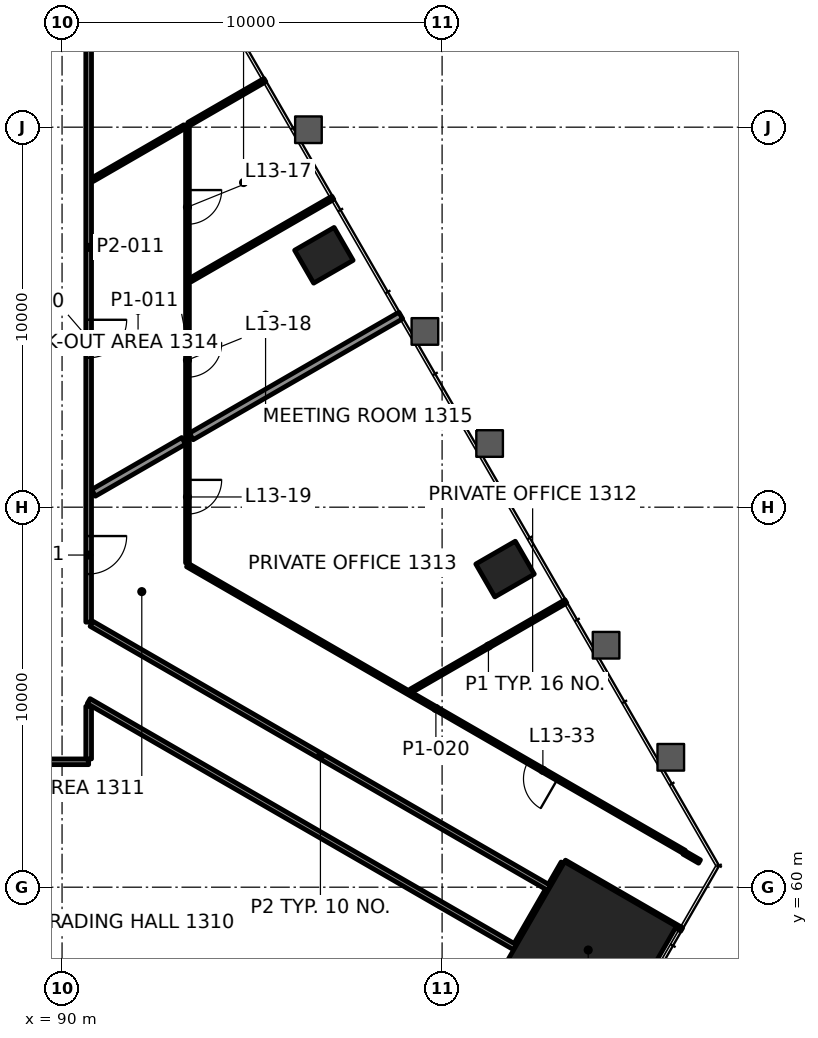
"""IFC4 building model, lengths in metres.
Left out: names, types, materials, properties, quantities, classifications, styles, units other than length and angle.
Written with IfcOpenShell. Run it as: python <this file> out.ifc"""

import sys

from ifc_helpers import new_model, si_unit, direction, frame, frame_2d, origin, origin_2d, place, context, subcontext, project, spatial, rectangle, extrude, element, fill, save


model = new_model("IFC4")
c1 = context("Model", 3, precision=1e-05, world=origin(), true_north=direction((0.0, 1.0)))
c2 = subcontext(c1, "Body", "Model", "MODEL_VIEW")
j1 = project(units=[si_unit("LENGTHUNIT", "METRE"), si_unit("PLANEANGLEUNIT", "RADIAN")], contexts=[c1])
p1 = place(None, origin())
s1 = spatial("IfcSite", under=j1, at=p1, CompositionType="ELEMENT")
p2 = place(p1, origin())
s2 = spatial("IfcBuilding", under=s1, at=p2, CompositionType="ELEMENT")
p3 = place(p2, frame((0.0, 0.0, 61.0)))
s3 = spatial("IfcBuildingStorey", under=s2, at=p3, CompositionType="ELEMENT", Elevation=61.0)
p4 = place(p3, frame((103.844, 58.347, 0.0), z_axis=(0.0, 0.0, 1.0), x_axis=(0.5, 0.866025403784, 0.0)))
e1 = element("IfcColumn", 1, at=p4, inside=s3, PredefinedType="COLUMN", context=c2, shape_type="SweptSolid", body=[
    extrude(rectangle(XDim=3.4, YDim=3.4, at=origin_2d()), origin(), (0.0, 0.0, 1.0), 4.2),
])
for number, where, z_axis, x_axis in (
    (2, (101.657, 68.371, -0.0), (0.0, 0.0, 1.0), (-0.5, 0.866, 0.0)),
    (3, (96.889, 76.628, -0.0), (0.0, 0.0, 1.0), (-0.5, 0.866, 0.0)),
):
    element("IfcColumn", number, at=place(p3, frame(where, z_axis=z_axis, x_axis=x_axis)), inside=s3, PredefinedType="COLUMN", context=c2, shape_type="SweptSolid", body=[
        extrude(rectangle(XDim=1.0, YDim=1.2, at=origin_2d()), origin(), (0.0, 0.0, 1.0), 4.2),
    ])
p5 = place(p3, frame((90.699, 63.3, 0.0), z_axis=(0.0, 0.0, 1.0), x_axis=(-1.0, 0.0, 0.0)))
e4 = element("IfcWall", 4, at=p5, inside=s3, PredefinedType="PARTITIONING", context=c2, shape_type="SweptSolid", body=[
    extrude(rectangle(XDim=31.399, YDim=0.15, at=frame_2d((15.7, 0.0))), origin(), (0.0, 0.0, 1.0), 3.4),
])
p6 = place(p5, frame((4.968, 0.0, 0.0)))
e5 = element("IfcOpeningElement", 5, at=p6, cuts=e4, PredefinedType="OPENING", context=c2, shape_type="SweptSolid", body=[
    extrude(rectangle(XDim=1.2, YDim=2.1, at=frame_2d((0.6, 1.05))), frame((0.0, 0.085, 0.0), z_axis=(0.0, -1.0, 0.0), x_axis=(1.0, 0.0, 0.0)), (0.0, 0.0, 1.0), 0.17),
])
p7 = place(p5, frame((13.908, 0.0, 0.0)))
e6 = element("IfcOpeningElement", 6, at=p7, cuts=e4, PredefinedType="OPENING", context=c2, shape_type="SweptSolid", body=[
    extrude(rectangle(XDim=1.2, YDim=2.1, at=frame_2d((0.6, 1.05))), frame((0.0, 0.085, 0.0), z_axis=(0.0, -1.0, 0.0), x_axis=(1.0, 0.0, 0.0)), (0.0, 0.0, 1.0), 0.17),
])
p8 = place(p5, frame((24.14, 0.0, 0.0)))
e7 = element("IfcOpeningElement", 7, at=p8, cuts=e4, PredefinedType="OPENING", context=c2, shape_type="SweptSolid", body=[
    extrude(rectangle(XDim=1.0, YDim=2.1, at=frame_2d((0.5, 1.05))), frame((0.0, 0.085, 0.0), z_axis=(0.0, -1.0, 0.0), x_axis=(1.0, 0.0, 0.0)), (0.0, 0.0, 1.0), 0.17),
])
p9 = place(p3, frame((99.182, 65.168, 0.0), z_axis=(0.0, 0.0, 1.0), x_axis=(0.866024864377, 0.50000093428, 0.0)))
e8 = element("IfcWall", 8, at=p9, inside=s3, PredefinedType="PARTITIONING", context=c2, shape_type="SweptSolid", body=[
    extrude(rectangle(XDim=4.705, YDim=0.1, at=frame_2d((2.353, 0.0))), origin(), (0.0, 0.0, 1.0), 3.4),
])
p10 = place(p3, frame((90.827, 70.376, 0.0), z_axis=(0.0, 0.0, 1.0), x_axis=(0.866019409031, 0.500010383074, 0.0)))
e9 = element("IfcWall", 9, at=p10, inside=s3, PredefinedType="PARTITIONING", context=c2, shape_type="SweptSolid", body=[
    extrude(rectangle(XDim=2.74, YDim=0.2, at=frame_2d((1.37, 0.0))), origin(), (0.0, 0.0, 1.0), 3.4),
])
p11 = place(p3, frame((93.376, 75.976, 0.0), z_axis=(0.0, 0.0, 1.0), x_axis=(0.866006192811, 0.500033272906, 0.0)))
e10 = element("IfcWall", 10, at=p11, inside=s3, PredefinedType="PARTITIONING", context=c2, shape_type="SweptSolid", body=[
    extrude(rectangle(XDim=4.329, YDim=0.1, at=frame_2d((2.165, 0.0))), origin(), (0.0, 0.0, 1.0), 3.165),
])
p12 = place(p3, frame((90.801, 78.618, 0.0), z_axis=(0.0, 0.0, 1.0), x_axis=(0.866028733576, 0.499994232587, 0.0)))
e11 = element("IfcWall", 11, at=p12, inside=s3, PredefinedType="PARTITIONING", context=c2, shape_type="SweptSolid", body=[
    extrude(rectangle(XDim=2.799, YDim=0.1, at=frame_2d((1.4, 0.0))), origin(), (0.0, 0.0, 1.0), 3.4),
])
p13 = place(p3, frame((101.96, 58.482, 0.0), z_axis=(0.0, 0.0, 1.0), x_axis=(0.500102515474, 0.865966208357, 0.0)))
e12 = element("IfcWall", 12, at=p13, inside=s3, PredefinedType="PARTITIONING", context=c2, shape_type="SweptSolid", body=[
    extrude(rectangle(XDim=1.65, YDim=0.15, at=frame_2d((0.825, 0.0))), origin(), (0.0, 0.0, 1.0), 3.247),
])
p14 = place(p3, frame((93.3, 80.061, 0.0), z_axis=(0.0, 0.0, 1.0), x_axis=(0.0, -1.0, 0.0)))
e13 = element("IfcWall", 13, at=p14, inside=s3, PredefinedType="PARTITIONING", context=c2, shape_type="SweptSolid", body=[
    extrude(rectangle(XDim=11.527, YDim=0.1, at=frame_2d((5.764, 0.0))), origin(), (0.0, 0.0, 1.0), 3.4),
])
p15 = place(p14, frame((1.716, 0.0, 0.0)))
e14 = element("IfcOpeningElement", 14, at=p15, cuts=e13, PredefinedType="OPENING", context=c2, shape_type="SweptSolid", body=[
    extrude(rectangle(XDim=0.9, YDim=2.1, at=frame_2d((0.45, 1.05))), frame((0.0, 0.06, 0.0), z_axis=(0.0, -1.0, 0.0), x_axis=(1.0, 0.0, 0.0)), (0.0, 0.0, 1.0), 0.12),
])
p16 = place(p14, frame((5.741, 0.0, 0.0)))
e15 = element("IfcOpeningElement", 15, at=p16, cuts=e13, PredefinedType="OPENING", context=c2, shape_type="SweptSolid", body=[
    extrude(rectangle(XDim=0.9, YDim=2.1, at=frame_2d((0.45, 1.05))), frame((0.0, 0.06, 0.0), z_axis=(0.0, -1.0, 0.0), x_axis=(1.0, 0.0, 0.0)), (0.0, 0.0, 1.0), 0.12),
])
p17 = place(p14, frame((9.342, 0.0, 0.0)))
e16 = element("IfcOpeningElement", 16, at=p17, cuts=e13, PredefinedType="OPENING", context=c2, shape_type="SweptSolid", body=[
    extrude(rectangle(XDim=0.9, YDim=2.1, at=frame_2d((0.45, 1.05))), frame((0.0, 0.06, 0.0), z_axis=(0.0, -1.0, 0.0), x_axis=(1.0, 0.0, 0.0)), (0.0, 0.0, 1.0), 0.12),
])
p18 = place(p3, frame((90.7, 63.375, 0.0), z_axis=(0.0, 0.0, 1.0), x_axis=(0.0, 1.0, 0.0)))
e17 = element("IfcWall", 17, at=p18, inside=s3, PredefinedType="PARTITIONING", context=c2, shape_type="SweptSolid", body=[
    extrude(rectangle(XDim=1.384, YDim=0.15, at=frame_2d((0.692, 0.0))), origin(), (0.0, 0.0, 1.0), 3.247),
])
p19 = place(p3, frame((90.7, 86.699, 0.0), z_axis=(0.0, 0.0, 1.0), x_axis=(0.0, -1.0, 0.0)))
e18 = element("IfcWall", 18, at=p19, inside=s3, PredefinedType="PARTITIONING", context=c2, shape_type="SweptSolid", body=[
    extrude(rectangle(XDim=19.725, YDim=0.15, at=frame_2d((9.862, 0.0))), origin(), (0.0, 0.0, 1.0), 3.4),
])
p20 = place(p19, frame((11.768, 0.0, 0.0)))
e19 = element("IfcOpeningElement", 19, at=p20, cuts=e18, PredefinedType="OPENING", context=c2, shape_type="SweptSolid", body=[
    extrude(rectangle(XDim=1.0, YDim=2.1, at=frame_2d((0.5, 1.05))), frame((0.0, 0.085, 0.0), z_axis=(0.0, -1.0, 0.0), x_axis=(1.0, 0.0, 0.0)), (0.0, 0.0, 1.0), 0.17),
])
p21 = place(p19, frame((17.459, 0.0, 0.0)))
e20 = element("IfcOpeningElement", 20, at=p21, cuts=e18, PredefinedType="OPENING", context=c2, shape_type="SweptSolid", body=[
    extrude(rectangle(XDim=1.0, YDim=2.1, at=frame_2d((0.5, 1.05))), frame((0.0, 0.085, 0.0), z_axis=(0.0, -1.0, 0.0), x_axis=(1.0, 0.0, 0.0)), (0.0, 0.0, 1.0), 0.17),
])
p22 = place(p3, frame((106.374, 60.928, 0.0), z_axis=(0.0, 0.0, 1.0), x_axis=(-0.866022109353, 0.50000570608, 0.0)))
e21 = element("IfcWall", 21, at=p22, inside=s3, PredefinedType="PARTITIONING", context=c2, shape_type="SweptSolid", body=[
    extrude(rectangle(XDim=15.096, YDim=0.1, at=frame_2d((7.548, 0.0))), origin(), (0.0, 0.0, 1.0), 3.4),
])
p23 = place(p22, frame((3.847, 0.0, 0.0)))
e22 = element("IfcOpeningElement", 22, at=p23, cuts=e21, PredefinedType="OPENING", context=c2, shape_type="SweptSolid", body=[
    extrude(rectangle(XDim=0.9, YDim=2.1, at=frame_2d((0.45, 1.05))), frame((0.0, 0.06, 0.0), z_axis=(0.0, -1.0, 0.0), x_axis=(1.0, 0.0, 0.0)), (0.0, 0.0, 1.0), 0.12),
])
p24 = place(p3, frame((106.774, 60.675, 0.0), z_axis=(0.0, 0.0, 1.0), x_axis=(-0.865979310119, 0.500079828073, 0.0)))
e23 = element("IfcWall", 23, at=p24, inside=s3, PredefinedType="PARTITIONING", context=c2, shape_type="SweptSolid", body=[
    extrude(rectangle(XDim=0.473, YDim=0.1, at=frame_2d((0.237, 0.0))), origin(), (0.0, 0.0, 1.0), 3.4),
])
p25 = place(p3, frame((106.305, 58.888, 0.0), z_axis=(0.0, 0.0, 1.0), x_axis=(-0.866061095881, 0.499938174379, 0.0)))
e24 = element("IfcWall", 24, at=p25, inside=s3, PredefinedType="PARTITIONING", context=c2, shape_type="SweptSolid", body=[
    extrude(rectangle(XDim=3.56, YDim=0.1, at=frame_2d((1.78, 0.0))), origin(), (0.0, 0.0, 1.0), 3.4),
])
p26 = place(p3, frame((102.822, 59.976, 0.0), z_axis=(0.0, 0.0, 1.0), x_axis=(-0.866019280802, 0.500010605167, 0.0)))
e25 = element("IfcWall", 25, at=p26, inside=s3, PredefinedType="PARTITIONING", context=c2, shape_type="SweptSolid", body=[
    extrude(rectangle(XDim=13.91, YDim=0.15, at=frame_2d((6.955, 0.0))), origin(), (0.0, 0.0, 1.0), 3.4),
])
p27 = place(p3, frame((101.922, 58.417, 0.0), z_axis=(0.0, 0.0, 1.0), x_axis=(-0.866024629744, 0.500001340675, 0.0)))
e26 = element("IfcWall", 26, at=p27, inside=s3, PredefinedType="PARTITIONING", context=c2, shape_type="SweptSolid", body=[
    extrude(rectangle(XDim=12.958, YDim=0.15, at=frame_2d((6.479, 0.0))), origin(), (0.0, 0.0, 1.0), 3.247),
])
p28 = place(p3, frame((93.4, 71.862, 0.0), z_axis=(0.0, 0.0, 1.0), x_axis=(0.866018247172, 0.500012395411, 0.0)))
e27 = element("IfcWall", 27, at=p28, inside=s3, PredefinedType="PARTITIONING", context=c2, shape_type="SweptSolid", body=[
    extrude(rectangle(XDim=6.365, YDim=0.2, at=frame_2d((3.183, 0.0))), origin(), (0.0, 0.0, 1.0), 3.165),
])
p29 = place(p3, frame((93.337, 80.083, 0.0), z_axis=(0.0, 0.0, 1.0), x_axis=(0.866028885721, 0.49999396906, 0.0)))
e28 = element("IfcWall", 28, at=p29, inside=s3, PredefinedType="PARTITIONING", context=c2, shape_type="SweptSolid", body=[
    extrude(rectangle(XDim=2.309, YDim=0.1, at=frame_2d((1.155, 0.0))), origin(), (0.0, 0.0, 1.0), 3.165),
])
p30 = place(p3, frame((102.86, 60.041, 0.0), z_axis=(0.0, 0.0, 1.0), x_axis=(0.500036104519, 0.866004557827, 0.0)))
e29 = element("IfcWall", 29, at=p30, inside=s3, PredefinedType="PARTITIONING", context=c2, shape_type="SweptSolid", body=[
    extrude(rectangle(XDim=0.674, YDim=0.15, at=frame_2d((0.337, 0.0))), origin(), (0.0, 0.0, 1.0), 3.4),
])
p31 = place(p15, origin())
e30 = element("IfcDoor", 30, at=p31, inside=s3, OperationType="SINGLE_SWING_RIGHT", PredefinedType="DOOR", context=c2, shape_type="SweptSolid", body=[
    extrude(rectangle(XDim=0.9, YDim=2.1, at=frame_2d((0.45, 1.05))), frame((0.0, 0.025, 0.0), z_axis=(0.0, -1.0, 0.0), x_axis=(1.0, 0.0, 0.0)), (0.0, 0.0, 1.0), 0.05),
])
fill(e14, e30)
p32 = place(p16, origin())
e31 = element("IfcDoor", 31, at=p32, inside=s3, OperationType="SINGLE_SWING_LEFT", PredefinedType="DOOR", context=c2, shape_type="SweptSolid", body=[
    extrude(rectangle(XDim=0.9, YDim=2.1, at=frame_2d((0.45, 1.05))), frame((0.0, 0.025, 0.0), z_axis=(0.0, -1.0, 0.0), x_axis=(1.0, 0.0, 0.0)), (0.0, 0.0, 1.0), 0.05),
])
fill(e15, e31)
p33 = place(p17, origin())
e32 = element("IfcDoor", 32, at=p33, inside=s3, OperationType="SINGLE_SWING_LEFT", PredefinedType="DOOR", context=c2, shape_type="SweptSolid", body=[
    extrude(rectangle(XDim=0.9, YDim=2.1, at=frame_2d((0.45, 1.05))), frame((0.0, 0.025, 0.0), z_axis=(0.0, -1.0, 0.0), x_axis=(1.0, 0.0, 0.0)), (0.0, 0.0, 1.0), 0.05),
])
fill(e16, e32)
p34 = place(p20, origin())
e33 = element("IfcDoor", 33, at=p34, inside=s3, OperationType="SINGLE_SWING_RIGHT", PredefinedType="DOOR", context=c2, shape_type="SweptSolid", body=[
    extrude(rectangle(XDim=1.0, YDim=2.1, at=frame_2d((0.5, 1.05))), frame((0.0, 0.025, 0.0), z_axis=(0.0, -1.0, 0.0), x_axis=(1.0, 0.0, 0.0)), (0.0, 0.0, 1.0), 0.05),
])
fill(e19, e33)
p35 = place(p21, origin())
e34 = element("IfcDoor", 34, at=p35, inside=s3, OperationType="SINGLE_SWING_LEFT", PredefinedType="DOOR", context=c2, shape_type="SweptSolid", body=[
    extrude(rectangle(XDim=1.0, YDim=2.1, at=frame_2d((0.5, 1.05))), frame((0.0, 0.025, 0.0), z_axis=(0.0, -1.0, 0.0), x_axis=(1.0, 0.0, 0.0)), (0.0, 0.0, 1.0), 0.05),
])
fill(e20, e34)
p36 = place(p23, origin())
e35 = element("IfcDoor", 35, at=p36, inside=s3, OperationType="SINGLE_SWING_LEFT", PredefinedType="DOOR", context=c2, shape_type="SweptSolid", body=[
    extrude(rectangle(XDim=0.9, YDim=2.1, at=frame_2d((0.45, 1.05))), frame((0.0, 0.025, 0.0), z_axis=(0.0, -1.0, 0.0), x_axis=(1.0, 0.0, 0.0)), (0.0, 0.0, 1.0), 0.05),
])
fill(e22, e35)
save(model, sys.argv[1])
